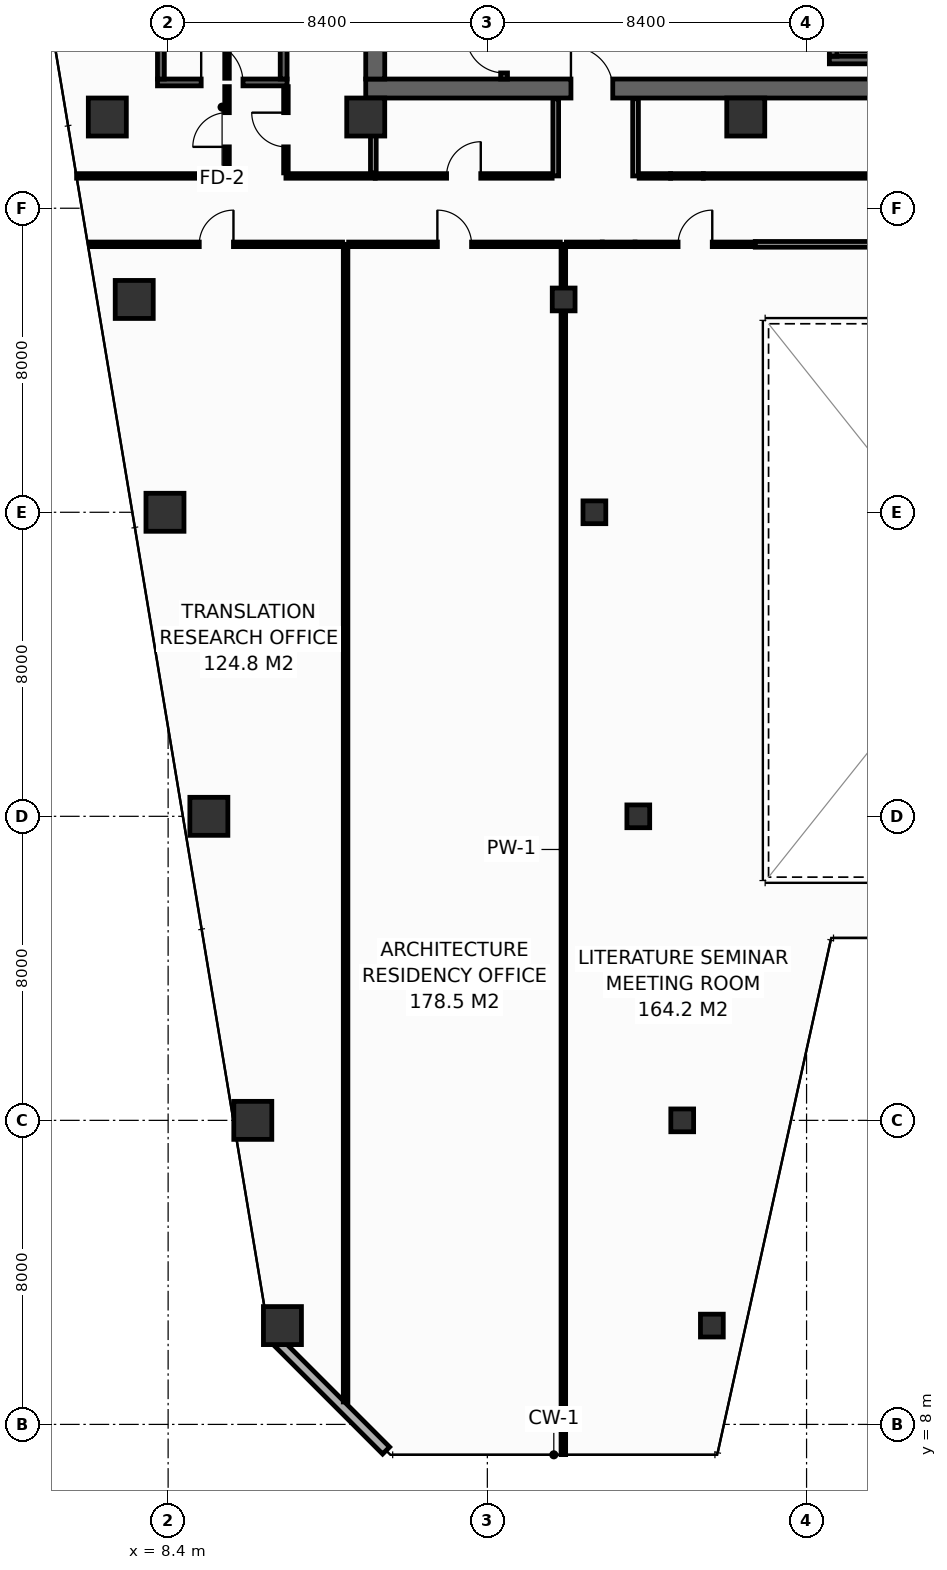
"""IFC4 building model, lengths in metres.
Left out: names, types, materials, properties, quantities, classifications, styles, units other than length and angle.
Written with IfcOpenShell. Run it as: python <this file> out.ifc"""

import sys

from ifc_helpers import new_model, si_unit, direction, frame, frame_2d, origin, origin_2d, place, context, subcontext, project, spatial, rectangle, hollow_rectangle, extrude, element, fill, save


model = new_model("IFC4")
c1 = context("Model", 3, precision=1e-05, world=origin(), true_north=direction((0.0, 1.0)))
c2 = subcontext(c1, "Body", "Model", "MODEL_VIEW")
j1 = project(units=[si_unit("LENGTHUNIT", "METRE"), si_unit("PLANEANGLEUNIT", "RADIAN")], contexts=[c1])
p1 = place(None, origin())
s1 = spatial("IfcSite", under=j1, at=p1, CompositionType="ELEMENT")
p2 = place(p1, origin())
s2 = spatial("IfcBuilding", under=s1, at=p2, CompositionType="ELEMENT")
p3 = place(p2, frame((0.0, 0.0, 163.8)))
s3 = spatial("IfcBuildingStorey", under=s2, at=p3, CompositionType="ELEMENT", Elevation=163.8)
p4 = place(p3, frame((13.6, 43.15, 0.0), z_axis=(0.0, 0.0, 1.0), x_axis=(1.0, 0.0, 0.0)))
e1 = element("IfcWall", 1, at=p4, inside=s3, PredefinedType="SHEAR", context=c2, shape_type="SweptSolid", body=[
    extrude(rectangle(XDim=32.7, YDim=0.5, at=frame_2d((16.35, 0.0))), origin(), (0.0, 0.0, 1.0), 3.55),
])
p5 = place(p4, frame((5.4, 0.0, 0.0)))
e2 = element("IfcOpeningElement", 2, at=p5, cuts=e1, PredefinedType="OPENING", context=c2, shape_type="SweptSolid", body=[
    extrude(rectangle(XDim=1.1, YDim=2.15, at=frame_2d((0.55, 1.075))), frame((0.0, 0.26, 0.0), z_axis=(0.0, -1.0, 0.0), x_axis=(1.0, 0.0, 0.0)), (0.0, 0.0, 1.0), 0.52),
])
p6 = place(p4, frame((25.6, 0.0, 0.0)))
e3 = element("IfcOpeningElement", 3, at=p6, cuts=e1, PredefinedType="OPENING", context=c2, shape_type="SweptSolid", body=[
    extrude(rectangle(XDim=1.1, YDim=2.15, at=frame_2d((0.55, 1.075))), frame((0.0, 0.26, 0.0), z_axis=(0.0, -1.0, 0.0), x_axis=(1.0, 0.0, 0.0)), (0.0, 0.0, 1.0), 0.52),
])
p7 = place(p3, frame((13.85, 43.4, 0.0), z_axis=(0.0, 0.0, 1.0), x_axis=(0.0, 1.0, 0.0)))
e4 = element("IfcWall", 4, at=p7, inside=s3, PredefinedType="SHEAR", context=c2, shape_type="SweptSolid", body=[
    extrude(rectangle(XDim=10.4, YDim=0.5, at=frame_2d((5.2, 0.0))), origin(), (0.0, 0.0, 1.0), 3.55),
])
for number, where, z_axis, x_axis in (
    (5, (6.8, 42.4, 0.0), (0.0, 0.0, 1.0), (1.0, 0.0, 0.0)),
    (6, (13.6, 42.4, 0.0), (0.0, 0.0, 1.0), (1.0, 0.0, 0.0)),
    (7, (23.6, 42.4, 0.0), (0.0, 0.0, 1.0), (1.0, 0.0, 0.0)),
    (8, (11.408, 10.6, 0.0), (0.0, 0.0, 1.0), (1.0, 0.0, 0.0)),
):
    element("IfcColumn", number, at=place(p3, frame(where, z_axis=z_axis, x_axis=x_axis)), inside=s3, PredefinedType="COLUMN", context=c2, shape_type="SweptSolid", body=[
        extrude(hollow_rectangle(XDim=1.0, YDim=1.0, WallThickness=0.045, at=origin_2d()), origin(), (0.0, 0.0, 1.0), 3.8),
    ])
p8 = place(p3, frame((22.708, 10.6, 0.0), z_axis=(0.0, 0.0, 1.0), x_axis=(1.0, 0.0, 0.0)))
e9 = element("IfcColumn", 9, at=p8, inside=s3, PredefinedType="COLUMN", context=c2, shape_type="SweptSolid", body=[
    extrude(hollow_rectangle(XDim=0.6, YDim=0.6, WallThickness=0.028, at=origin_2d()), origin(), (0.0, 0.0, 1.0), 3.8),
])
p9 = place(p3, frame((10.628, 16.0, 0.0), z_axis=(0.0, 0.0, 1.0), x_axis=(1.0, 0.0, 0.0)))
e10 = element("IfcColumn", 10, at=p9, inside=s3, PredefinedType="COLUMN", context=c2, shape_type="SweptSolid", body=[
    extrude(hollow_rectangle(XDim=1.0, YDim=1.0, WallThickness=0.045, at=origin_2d()), origin(), (0.0, 0.0, 1.0), 3.8),
])
p10 = place(p3, frame((21.928, 16.0, 0.0), z_axis=(0.0, 0.0, 1.0), x_axis=(1.0, 0.0, 0.0)))
e11 = element("IfcColumn", 11, at=p10, inside=s3, PredefinedType="COLUMN", context=c2, shape_type="SweptSolid", body=[
    extrude(hollow_rectangle(XDim=0.6, YDim=0.6, WallThickness=0.028, at=origin_2d()), origin(), (0.0, 0.0, 1.0), 3.8),
])
p11 = place(p3, frame((9.472, 24.0, 0.0), z_axis=(0.0, 0.0, 1.0), x_axis=(1.0, 0.0, 0.0)))
e12 = element("IfcColumn", 12, at=p11, inside=s3, PredefinedType="COLUMN", context=c2, shape_type="SweptSolid", body=[
    extrude(hollow_rectangle(XDim=1.0, YDim=1.0, WallThickness=0.045, at=origin_2d()), origin(), (0.0, 0.0, 1.0), 3.8),
])
p12 = place(p3, frame((20.772, 24.0, 0.0), z_axis=(0.0, 0.0, 1.0), x_axis=(1.0, 0.0, 0.0)))
e13 = element("IfcColumn", 13, at=p12, inside=s3, PredefinedType="COLUMN", context=c2, shape_type="SweptSolid", body=[
    extrude(hollow_rectangle(XDim=0.6, YDim=0.6, WallThickness=0.028, at=origin_2d()), origin(), (0.0, 0.0, 1.0), 3.8),
])
p13 = place(p3, frame((8.317, 32.0, 0.0), z_axis=(0.0, 0.0, 1.0), x_axis=(1.0, 0.0, 0.0)))
e14 = element("IfcColumn", 14, at=p13, inside=s3, PredefinedType="COLUMN", context=c2, shape_type="SweptSolid", body=[
    extrude(hollow_rectangle(XDim=1.0, YDim=1.0, WallThickness=0.045, at=origin_2d()), origin(), (0.0, 0.0, 1.0), 3.8),
])
p14 = place(p3, frame((19.617, 32.0, 0.0), z_axis=(0.0, 0.0, 1.0), x_axis=(1.0, 0.0, 0.0)))
e15 = element("IfcColumn", 15, at=p14, inside=s3, PredefinedType="COLUMN", context=c2, shape_type="SweptSolid", body=[
    extrude(hollow_rectangle(XDim=0.6, YDim=0.6, WallThickness=0.028, at=origin_2d()), origin(), (0.0, 0.0, 1.0), 3.8),
])
p15 = place(p3, frame((7.508, 37.6, 0.0), z_axis=(0.0, 0.0, 1.0), x_axis=(1.0, 0.0, 0.0)))
e16 = element("IfcColumn", 16, at=p15, inside=s3, PredefinedType="COLUMN", context=c2, shape_type="SweptSolid", body=[
    extrude(hollow_rectangle(XDim=1.0, YDim=1.0, WallThickness=0.045, at=origin_2d()), origin(), (0.0, 0.0, 1.0), 3.8),
])
p16 = place(p3, frame((18.808, 37.6, 0.0), z_axis=(0.0, 0.0, 1.0), x_axis=(1.0, 0.0, 0.0)))
e17 = element("IfcColumn", 17, at=p16, inside=s3, PredefinedType="COLUMN", context=c2, shape_type="SweptSolid", body=[
    extrude(hollow_rectangle(XDim=0.6, YDim=0.6, WallThickness=0.028, at=origin_2d()), origin(), (0.0, 0.0, 1.0), 3.8),
])
p17 = place(p3, frame((25.8, 43.9, 0.0), z_axis=(0.0, 0.0, 1.0), x_axis=(1.0, 0.0, 0.0)))
e18 = element("IfcWall", 18, at=p17, inside=s3, PredefinedType="SHEAR", context=c2, shape_type="SweptSolid", body=[
    extrude(rectangle(XDim=2.575, YDim=0.2, at=frame_2d((1.288, 0.0))), origin(), (0.0, 0.0, 1.0), 3.55),
])
p18 = place(p3, frame((25.9, 44.0, 0.0), z_axis=(0.0, 0.0, 1.0), x_axis=(0.0, 1.0, 0.0)))
e19 = element("IfcWall", 19, at=p18, inside=s3, PredefinedType="SHEAR", context=c2, shape_type="SweptSolid", body=[
    extrude(rectangle(XDim=2.3, YDim=0.2, at=frame_2d((1.15, 0.0))), origin(), (0.0, 0.0, 1.0), 3.55),
])
p19 = place(p3, frame((17.24, 43.4, 0.0), z_axis=(0.0, 0.0, 1.0), x_axis=(0.0, 1.0, 0.0)))
e20 = element("IfcWall", 20, at=p19, inside=s3, PredefinedType="SHEAR", context=c2, shape_type="SweptSolid", body=[
    extrude(rectangle(XDim=10.4, YDim=0.18, at=frame_2d((5.2, 0.0))), origin(), (0.0, 0.0, 1.0), 3.55),
])
p20 = place(p19, frame((0.16, 0.0, 0.0)))
e21 = element("IfcOpeningElement", 21, at=p20, cuts=e20, PredefinedType="OPENING", context=c2, shape_type="SweptSolid", body=[
    extrude(rectangle(XDim=1.0, YDim=2.15, at=frame_2d((0.5, 1.075))), frame((0.0, 0.1, 0.0), z_axis=(0.0, -1.0, 0.0), x_axis=(1.0, 0.0, 0.0)), (0.0, 0.0, 1.0), 0.2),
])
p21 = place(p3, frame((8.12, 43.31, 0.0), z_axis=(0.0, 0.0, 1.0), x_axis=(1.0, 0.0, 0.0)))
e22 = element("IfcWall", 22, at=p21, inside=s3, PredefinedType="SHEAR", context=c2, shape_type="SweptSolid", body=[
    extrude(rectangle(XDim=3.41, YDim=0.18, at=frame_2d((1.705, 0.0))), origin(), (0.0, 0.0, 1.0), 3.55),
])
p22 = place(p21, frame((1.15, 0.0, 0.0)))
e23 = element("IfcOpeningElement", 23, at=p22, cuts=e22, PredefinedType="OPENING", context=c2, shape_type="SweptSolid", body=[
    extrude(rectangle(XDim=1.1, YDim=2.15, at=frame_2d((0.55, 1.075))), frame((0.0, 0.1, 0.0), z_axis=(0.0, -1.0, 0.0), x_axis=(1.0, 0.0, 0.0)), (0.0, 0.0, 1.0), 0.2),
])
for number, where, z_axis, x_axis in (
    (24, (11.44, 43.4, 0.0), (0.0, 0.0, 1.0), (0.0, 1.0, 0.0)),
    (25, (8.21, 53.8, 0.0), (0.0, 0.0, 1.0), (0.0, -1.0, 0.0)),
):
    element("IfcWall", number, at=place(p3, frame(where, z_axis=z_axis, x_axis=x_axis)), inside=s3, PredefinedType="SHEAR", context=c2, shape_type="SweptSolid", body=[
        extrude(rectangle(XDim=10.4, YDim=0.18, at=frame_2d((5.2, 0.0))), origin(), (0.0, 0.0, 1.0), 3.55),
    ])
p23 = place(p3, frame((11.162, 10.287, 0.0), z_axis=(0.0, 0.0, 1.0), x_axis=(0.70707775441, -0.707135806771, 0.0)))
e26 = element("IfcWall", 26, at=p23, inside=s3, PredefinedType="STANDARD", context=c2, shape_type="SweptSolid", body=[
    extrude(rectangle(XDim=4.206, YDim=0.26, at=frame_2d((2.103, 0.0))), origin(), (0.0, 0.0, 1.0), 3.55),
])
p24 = place(p3, frame((5.992, 40.85, 0.0), z_axis=(0.0, 0.0, 1.0), x_axis=(1.0, 0.0, 0.0)))
e27 = element("IfcWall", 27, at=p24, inside=s3, PredefinedType="PARTITIONING", context=c2, shape_type="SweptSolid", body=[
    extrude(rectangle(XDim=3.958, YDim=0.12, at=frame_2d((1.979, 0.0))), origin(), (0.0, 0.0, 1.0), 3.035),
])
p25 = place(p3, frame((11.5, 40.85, 0.0), z_axis=(0.0, 0.0, 1.0), x_axis=(1.0, 0.0, 0.0)))
e28 = element("IfcWall", 28, at=p25, inside=s3, PredefinedType="PARTITIONING", context=c2, shape_type="SweptSolid", body=[
    extrude(rectangle(XDim=2.35, YDim=0.12, at=frame_2d((1.175, 0.0))), origin(), (0.0, 0.0, 1.0), 3.55),
])
p26 = place(p3, frame((9.95, 40.93, 0.0), z_axis=(0.0, 0.0, 1.0), x_axis=(0.0, 1.0, 0.0)))
e29 = element("IfcWall", 29, at=p26, inside=s3, PredefinedType="PARTITIONING", context=c2, shape_type="SweptSolid", body=[
    extrude(rectangle(XDim=2.27, YDim=0.12, at=frame_2d((1.135, 0.0))), origin(), (0.0, 0.0, 1.0), 2.835),
])
p27 = place(p26, frame((0.685, 0.0, 0.0)))
e30 = element("IfcOpeningElement", 30, at=p27, cuts=e29, PredefinedType="OPENING", context=c2, shape_type="SweptSolid", body=[
    extrude(rectangle(XDim=0.9, YDim=2.1, at=frame_2d((0.45, 1.05))), frame((0.0, 0.07, 0.0), z_axis=(0.0, -1.0, 0.0), x_axis=(1.0, 0.0, 0.0)), (0.0, 0.0, 1.0), 0.14),
])
p28 = place(p3, frame((9.95, 43.42, 0.0), z_axis=(0.0, 0.0, 1.0), x_axis=(0.0, 1.0, 0.0)))
e31 = element("IfcWall", 31, at=p28, inside=s3, PredefinedType="PARTITIONING", context=c2, shape_type="SweptSolid", body=[
    extrude(rectangle(XDim=1.45, YDim=0.12, at=frame_2d((0.725, 0.0))), origin(), (0.0, 0.0, 1.0), 3.55),
])
p29 = place(p3, frame((11.5, 40.93, 0.0), z_axis=(0.0, 0.0, 1.0), x_axis=(0.0, 1.0, 0.0)))
e32 = element("IfcWall", 32, at=p29, inside=s3, PredefinedType="PARTITIONING", context=c2, shape_type="SweptSolid", body=[
    extrude(rectangle(XDim=2.27, YDim=0.12, at=frame_2d((1.135, 0.0))), origin(), (0.0, 0.0, 1.0), 2.835),
])
p30 = place(p29, frame((0.685, 0.0, 0.0)))
e33 = element("IfcOpeningElement", 33, at=p30, cuts=e32, PredefinedType="OPENING", context=c2, shape_type="SweptSolid", body=[
    extrude(rectangle(XDim=0.9, YDim=2.1, at=frame_2d((0.45, 1.05))), frame((0.0, 0.07, 0.0), z_axis=(0.0, -1.0, 0.0), x_axis=(1.0, 0.0, 0.0)), (0.0, 0.0, 1.0), 0.14),
])
p31 = place(p3, frame((13.8, 40.93, 0.0), z_axis=(0.0, 0.0, 1.0), x_axis=(0.0, 1.0, 0.0)))
e34 = element("IfcWall", 34, at=p31, inside=s3, PredefinedType="PARTITIONING", context=c2, shape_type="SweptSolid", body=[
    extrude(rectangle(XDim=1.95, YDim=0.15, at=frame_2d((0.975, 0.0))), origin(), (0.0, 0.0, 1.0), 3.55),
])
for number, where, z_axis, x_axis in (
    (35, (18.6, 40.85, 0.0), (0.0, 0.0, 1.0), (0.0, 1.0, 0.0)),
    (36, (20.7, 40.85, 0.0), (0.0, 0.0, 1.0), (0.0, 1.0, 0.0)),
):
    element("IfcWall", number, at=place(p3, frame(where, z_axis=z_axis, x_axis=x_axis)), inside=s3, PredefinedType="PARTITIONING", context=c2, shape_type="SweptSolid", body=[
        extrude(rectangle(XDim=2.03, YDim=0.15, at=frame_2d((1.015, 0.0))), origin(), (0.0, 0.0, 1.0), 3.55),
    ])
p32 = place(p3, frame((13.85, 40.85, 0.0), z_axis=(0.0, 0.0, 1.0), x_axis=(1.0, 0.0, 0.0)))
e37 = element("IfcWall", 37, at=p32, inside=s3, PredefinedType="PARTITIONING", context=c2, shape_type="SweptSolid", body=[
    extrude(rectangle(XDim=4.655, YDim=0.12, at=frame_2d((2.327, 0.0))), origin(), (0.0, 0.0, 1.0), 3.55),
])
p33 = place(p32, frame((1.877, 0.0, 0.0)))
e38 = element("IfcOpeningElement", 38, at=p33, cuts=e37, PredefinedType="OPENING", context=c2, shape_type="SweptSolid", body=[
    extrude(rectangle(XDim=0.9, YDim=2.1, at=frame_2d((0.45, 1.05))), frame((0.0, 0.07, 0.0), z_axis=(0.0, -1.0, 0.0), x_axis=(1.0, 0.0, 0.0)), (0.0, 0.0, 1.0), 0.14),
])
p34 = place(p3, frame((22.484, 40.85, 0.0), z_axis=(0.0, 0.0, 1.0), x_axis=(1.0, 0.0, 0.0)))
e39 = element("IfcWall", 39, at=p34, inside=s3, PredefinedType="PARTITIONING", context=c2, shape_type="SweptSolid", body=[
    extrude(rectangle(XDim=10.436, YDim=0.12, at=frame_2d((5.218, 0.0))), origin(), (0.0, 0.0, 1.0), 3.55),
])
p35 = place(p34, frame((4.768, 0.0, 0.0)))
e40 = element("IfcOpeningElement", 40, at=p35, cuts=e39, PredefinedType="OPENING", context=c2, shape_type="SweptSolid", body=[
    extrude(rectangle(XDim=0.9, YDim=2.1, at=frame_2d((0.45, 1.05))), frame((0.0, 0.07, 0.0), z_axis=(0.0, -1.0, 0.0), x_axis=(1.0, 0.0, 0.0)), (0.0, 0.0, 1.0), 0.14),
])
p36 = place(p3, frame((20.795, 40.85, 0.0), z_axis=(0.0, 0.0, 1.0), x_axis=(1.0, 0.0, 0.0)))
e41 = element("IfcWall", 41, at=p36, inside=s3, PredefinedType="PARTITIONING", context=c2, shape_type="SweptSolid", body=[
    extrude(rectangle(XDim=0.827, YDim=0.12, at=frame_2d((0.413, 0.0))), origin(), (0.0, 0.0, 1.0), 3.55),
])
p37 = place(p3, frame((21.622, 40.85, 0.0), z_axis=(0.0, 0.0, 1.0), x_axis=(1.0, 0.0, 0.0)))
e42 = element("IfcWall", 42, at=p37, inside=s3, PredefinedType="PARTITIONING", context=c2, shape_type="SweptSolid", body=[
    extrude(rectangle(XDim=0.862, YDim=0.12, at=frame_2d((0.431, 0.0))), origin(), (0.0, 0.0, 1.0), 2.135),
])
p38 = place(p3, frame((13.07, 8.591, 0.0), z_axis=(0.0, 0.0, 1.0), x_axis=(0.0, 1.0, 0.0)))
e43 = element("IfcWall", 43, at=p38, inside=s3, PredefinedType="PARTITIONING", context=c2, shape_type="SweptSolid", body=[
    extrude(rectangle(XDim=30.459, YDim=0.12, at=frame_2d((15.229, 0.0))), origin(), (0.0, 0.0, 1.0), 1.735),
])
p39 = place(p3, frame((18.8, 7.205, 0.0), z_axis=(0.0, 0.0, 1.0), x_axis=(0.0, 1.0, 0.0)))
e44 = element("IfcWall", 44, at=p39, inside=s3, PredefinedType="PARTITIONING", context=c2, shape_type="SweptSolid", body=[
    extrude(rectangle(XDim=31.845, YDim=0.12, at=frame_2d((15.922, 0.0))), origin(), (0.0, 0.0, 1.0), 1.735),
])
p40 = place(p3, frame((6.348, 39.05, 0.0), z_axis=(0.0, 0.0, 1.0), x_axis=(1.0, 0.0, 0.0)))
e45 = element("IfcWall", 45, at=p40, inside=s3, PredefinedType="PARTITIONING", context=c2, shape_type="SweptSolid", body=[
    extrude(rectangle(XDim=6.642, YDim=0.12, at=frame_2d((3.321, 0.0))), origin(), (0.0, 0.0, 1.0), 3.035),
])
p41 = place(p40, frame((2.871, 0.0, 0.0)))
e46 = element("IfcOpeningElement", 46, at=p41, cuts=e45, PredefinedType="OPENING", context=c2, shape_type="SweptSolid", body=[
    extrude(rectangle(XDim=0.9, YDim=2.1, at=frame_2d((0.45, 1.05))), frame((0.0, 0.07, 0.0), z_axis=(0.0, -1.0, 0.0), x_axis=(1.0, 0.0, 0.0)), (0.0, 0.0, 1.0), 0.14),
])
p42 = place(p3, frame((13.15, 39.05, 0.0), z_axis=(0.0, 0.0, 1.0), x_axis=(1.0, 0.0, 0.0)))
e47 = element("IfcWall", 47, at=p42, inside=s3, PredefinedType="PARTITIONING", context=c2, shape_type="SweptSolid", body=[
    extrude(rectangle(XDim=5.57, YDim=0.12, at=frame_2d((2.785, 0.0))), origin(), (0.0, 0.0, 1.0), 3.55),
])
p43 = place(p42, frame((2.335, 0.0, 0.0)))
e48 = element("IfcOpeningElement", 48, at=p43, cuts=e47, PredefinedType="OPENING", context=c2, shape_type="SweptSolid", body=[
    extrude(rectangle(XDim=0.9, YDim=2.1, at=frame_2d((0.45, 1.05))), frame((0.0, 0.07, 0.0), z_axis=(0.0, -1.0, 0.0), x_axis=(1.0, 0.0, 0.0)), (0.0, 0.0, 1.0), 0.14),
])
p44 = place(p3, frame((20.687, 39.05, 0.0), z_axis=(0.0, 0.0, 1.0), x_axis=(1.0, 0.0, 0.0)))
e49 = element("IfcWall", 49, at=p44, inside=s3, PredefinedType="PARTITIONING", context=c2, shape_type="SweptSolid", body=[
    extrude(rectangle(XDim=3.164, YDim=0.12, at=frame_2d((1.582, 0.0))), origin(), (0.0, 0.0, 1.0), 3.55),
])
p45 = place(p44, frame((1.132, 0.0, 0.0)))
e50 = element("IfcOpeningElement", 50, at=p45, cuts=e49, PredefinedType="OPENING", context=c2, shape_type="SweptSolid", body=[
    extrude(rectangle(XDim=0.9, YDim=2.1, at=frame_2d((0.45, 1.05))), frame((0.0, 0.07, 0.0), z_axis=(0.0, -1.0, 0.0), x_axis=(1.0, 0.0, 0.0)), (0.0, 0.0, 1.0), 0.14),
])
p46 = place(p3, frame((18.88, 39.05, 0.0), z_axis=(0.0, 0.0, 1.0), x_axis=(1.0, 0.0, 0.0)))
e51 = element("IfcWall", 51, at=p46, inside=s3, PredefinedType="PARTITIONING", context=c2, shape_type="SweptSolid", body=[
    extrude(rectangle(XDim=0.945, YDim=0.12, at=frame_2d((0.472, 0.0))), origin(), (0.0, 0.0, 1.0), 3.55),
])
p47 = place(p3, frame((19.825, 39.05, 0.0), z_axis=(0.0, 0.0, 1.0), x_axis=(1.0, 0.0, 0.0)))
e52 = element("IfcWall", 52, at=p47, inside=s3, PredefinedType="PARTITIONING", context=c2, shape_type="SweptSolid", body=[
    extrude(rectangle(XDim=0.862, YDim=0.12, at=frame_2d((0.431, 0.0))), origin(), (0.0, 0.0, 1.0), 2.135),
])
p48 = place(p3, frame((23.85, 39.05, 0.0), z_axis=(0.0, 0.0, 1.0), x_axis=(1.0, 0.0, 0.0)))
e53 = element("IfcWall", 53, at=p48, inside=s3, PredefinedType="PARTITIONING", context=c2, shape_type="SweptSolid", body=[
    extrude(rectangle(XDim=12.3, YDim=0.15, at=frame_2d((6.15, 0.0))), origin(), (0.0, 0.0, 1.0), 3.55),
])
p49 = place(p20, origin())
e54 = element("IfcDoor", 54, at=p49, inside=s3, OperationType="SINGLE_SWING_RIGHT", PredefinedType="DOOR", context=c2, shape_type="SweptSolid", body=[
    extrude(rectangle(XDim=1.0, YDim=2.15, at=frame_2d((0.5, 1.075))), frame((0.0, 0.025, 0.0), z_axis=(0.0, -1.0, 0.0), x_axis=(1.0, 0.0, 0.0)), (0.0, 0.0, 1.0), 0.05),
])
fill(e21, e54)
p50 = place(p22, origin())
e55 = element("IfcDoor", 55, at=p50, inside=s3, OperationType="SINGLE_SWING_LEFT", PredefinedType="DOOR", context=c2, shape_type="SweptSolid", body=[
    extrude(rectangle(XDim=1.1, YDim=2.15, at=frame_2d((0.55, 1.075))), frame((0.0, 0.025, 0.0), z_axis=(0.0, -1.0, 0.0), x_axis=(1.0, 0.0, 0.0)), (0.0, 0.0, 1.0), 0.05),
])
fill(e23, e55)
p51 = place(p5, origin())
e56 = element("IfcDoor", 56, at=p51, inside=s3, OperationType="SINGLE_SWING_LEFT", PredefinedType="DOOR", context=c2, shape_type="SweptSolid", body=[
    extrude(rectangle(XDim=1.1, YDim=2.15, at=frame_2d((0.55, 1.075))), frame((0.0, 0.025, 0.0), z_axis=(0.0, -1.0, 0.0), x_axis=(1.0, 0.0, 0.0)), (0.0, 0.0, 1.0), 0.05),
])
fill(e2, e56)
p52 = place(p27, origin())
e57 = element("IfcDoor", 57, at=p52, inside=s3, OperationType="SINGLE_SWING_LEFT", PredefinedType="DOOR", context=c2, shape_type="SweptSolid", body=[
    extrude(rectangle(XDim=0.9, YDim=2.1, at=frame_2d((0.45, 1.05))), frame((0.0, 0.025, 0.0), z_axis=(0.0, -1.0, 0.0), x_axis=(1.0, 0.0, 0.0)), (0.0, 0.0, 1.0), 0.05),
])
fill(e30, e57)
p53 = place(p30, origin())
e58 = element("IfcDoor", 58, at=p53, inside=s3, OperationType="SINGLE_SWING_RIGHT", PredefinedType="DOOR", context=c2, shape_type="SweptSolid", body=[
    extrude(rectangle(XDim=0.9, YDim=2.1, at=frame_2d((0.45, 1.05))), frame((0.0, 0.025, 0.0), z_axis=(0.0, -1.0, 0.0), x_axis=(1.0, 0.0, 0.0)), (0.0, 0.0, 1.0), 0.05),
])
fill(e33, e58)
p54 = place(p33, origin())
e59 = element("IfcDoor", 59, at=p54, inside=s3, OperationType="SINGLE_SWING_RIGHT", PredefinedType="DOOR", context=c2, shape_type="SweptSolid", body=[
    extrude(rectangle(XDim=0.9, YDim=2.1, at=frame_2d((0.45, 1.05))), frame((0.0, 0.025, 0.0), z_axis=(0.0, -1.0, 0.0), x_axis=(1.0, 0.0, 0.0)), (0.0, 0.0, 1.0), 0.05),
])
fill(e38, e59)
p55 = place(p41, origin())
e60 = element("IfcDoor", 60, at=p55, inside=s3, OperationType="SINGLE_SWING_RIGHT", PredefinedType="DOOR", context=c2, shape_type="SweptSolid", body=[
    extrude(rectangle(XDim=0.9, YDim=2.1, at=frame_2d((0.45, 1.05))), frame((0.0, 0.025, 0.0), z_axis=(0.0, -1.0, 0.0), x_axis=(1.0, 0.0, 0.0)), (0.0, 0.0, 1.0), 0.05),
])
fill(e46, e60)
p56 = place(p43, origin())
e61 = element("IfcDoor", 61, at=p56, inside=s3, OperationType="SINGLE_SWING_LEFT", PredefinedType="DOOR", context=c2, shape_type="SweptSolid", body=[
    extrude(rectangle(XDim=0.9, YDim=2.1, at=frame_2d((0.45, 1.05))), frame((0.0, 0.025, 0.0), z_axis=(0.0, -1.0, 0.0), x_axis=(1.0, 0.0, 0.0)), (0.0, 0.0, 1.0), 0.05),
])
fill(e48, e61)
p57 = place(p45, origin())
e62 = element("IfcDoor", 62, at=p57, inside=s3, OperationType="SINGLE_SWING_RIGHT", PredefinedType="DOOR", context=c2, shape_type="SweptSolid", body=[
    extrude(rectangle(XDim=0.9, YDim=2.1, at=frame_2d((0.45, 1.05))), frame((0.0, 0.025, 0.0), z_axis=(0.0, -1.0, 0.0), x_axis=(1.0, 0.0, 0.0)), (0.0, 0.0, 1.0), 0.05),
])
fill(e50, e62)
save(model, sys.argv[1])
